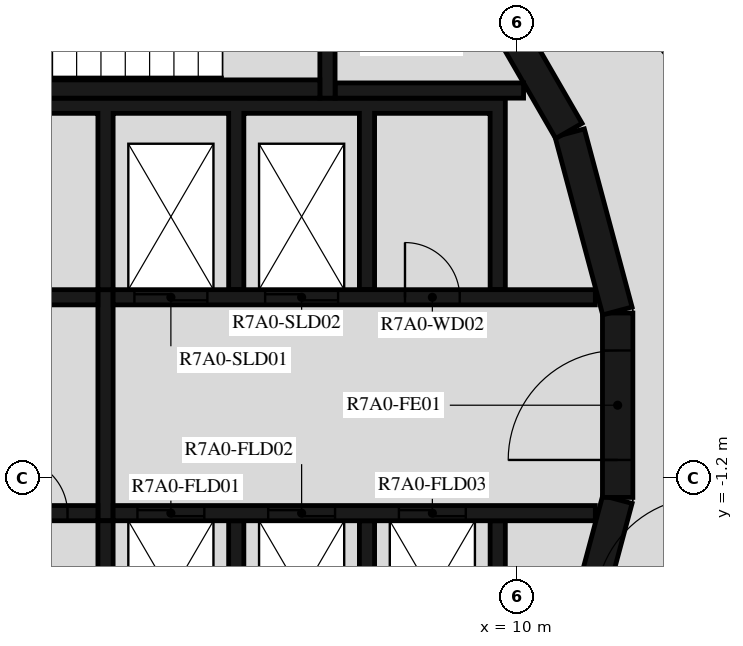
"""IFC4 building model, lengths in metres.
Left out: names, types, materials, properties, quantities, classifications, styles, units other than length and angle.
Written with IfcOpenShell. Run it as: python <this file> out.ifc"""

import sys

from ifc_helpers import new_model, si_unit, direction, frame, frame_2d, origin, place, context, subcontext, project, spatial, polyline, rectangle, outline, extrude, element, fill, save


model = new_model("IFC4")
c1 = context("Model", 3, precision=1e-05, world=origin(), true_north=direction((0.0, 1.0)))
c2 = subcontext(c1, "Body", "Model", "MODEL_VIEW")
j1 = project(units=[si_unit("LENGTHUNIT", "METRE"), si_unit("PLANEANGLEUNIT", "RADIAN")], contexts=[c1])
p1 = place(None, origin())
s1 = spatial("IfcSite", under=j1, at=p1, CompositionType="ELEMENT")
p2 = place(p1, origin())
s2 = spatial("IfcBuilding", under=s1, at=p2, CompositionType="ELEMENT")
p3 = place(p2, frame((0.0, 0.0, 263.4)))
s3 = spatial("IfcBuildingStorey", under=s2, at=p3, CompositionType="ELEMENT", Elevation=263.4)
p4 = place(p3, frame((10.858, -4.479, 0.0), z_axis=(0.0, 0.0, 1.0), x_axis=(0.258734743916, 0.965948410781, 0.0)))
e1 = element("IfcWall", 1, at=p4, inside=s3, PredefinedType="SHEAR", context=c2, shape_type="SweptSolid", body=[
    extrude(rectangle(XDim=3.033, YDim=0.5, at=frame_2d((1.516, 0.0))), origin(), (0.0, 0.0, 1.0), 3.12),
])
p5 = place(p3, frame((11.647, -1.516, 0.0), z_axis=(0.0, 0.0, 1.0), x_axis=(0.0, 1.0, 0.0)))
e2 = element("IfcWall", 2, at=p5, inside=s3, PredefinedType="SHEAR", context=c2, shape_type="SweptSolid", body=[
    extrude(rectangle(XDim=3.033, YDim=0.5, at=frame_2d((1.516, 0.0))), origin(), (0.0, 0.0, 1.0), 3.12),
])
p6 = place(p5, frame((0.616, 0.0, 0.0)))
e3 = element("IfcOpeningElement", 3, at=p6, cuts=e2, PredefinedType="OPENING", context=c2, shape_type="SweptSolid", body=[
    extrude(rectangle(XDim=1.8, YDim=2.1, at=frame_2d((0.9, 1.05))), frame((0.0, 0.26, 0.0), z_axis=(0.0, -1.0, 0.0), x_axis=(1.0, 0.0, 0.0)), (0.0, 0.0, 1.0), 0.52),
])
for number, where, z_axis, x_axis in (
    (4, (11.643, 1.55, 0.0), (0.0, 0.0, 1.0), (-0.259, 0.966, 0.0)),
    (5, (10.845, 4.51, 0.0), (0.0, 0.0, 1.0), (-0.5, 0.866, 0.0)),
):
    element("IfcWall", number, at=place(p3, frame(where, z_axis=z_axis, x_axis=x_axis)), inside=s3, PredefinedType="SHEAR", context=c2, shape_type="SweptSolid", body=[
        extrude(rectangle(XDim=3.033, YDim=0.5, at=frame_2d((1.516, 0.0))), origin(), (0.0, 0.0, 1.0), 3.12),
    ])
p7 = place(p3, frame((0.0, 5.2, 0.0), z_axis=(0.0, 0.0, 1.0), x_axis=(1.0, 0.0, 0.0)))
e6 = element("IfcWall", 6, at=p7, inside=s3, PredefinedType="SHEAR", context=c2, shape_type="SweptSolid", body=[
    extrude(rectangle(XDim=6.75, YDim=0.3, at=frame_2d((3.375, 0.0))), origin(), (0.0, 0.0, 1.0), 3.12),
])
p8 = place(p3, frame((6.875, 5.05, 0.0), z_axis=(0.0, 0.0, 1.0), x_axis=(0.0, 1.0, 0.0)))
e7 = element("IfcWall", 7, at=p8, inside=s3, PredefinedType="SHEAR", context=c2, shape_type="SweptSolid", body=[
    extrude(rectangle(XDim=3.92, YDim=0.25, at=frame_2d((1.96, 0.0))), origin(), (0.0, 0.0, 1.0), 3.12),
])
p9 = place(p8, frame((1.11, 0.0, 0.0)))
e8 = element("IfcOpeningElement", 8, at=p9, cuts=e7, PredefinedType="OPENING", context=c2, shape_type="SweptSolid", body=[
    extrude(rectangle(XDim=1.2, YDim=2.1, at=frame_2d((0.6, 1.05))), frame((0.0, 0.135, 0.0), z_axis=(0.0, -1.0, 0.0), x_axis=(1.0, 0.0, 0.0)), (0.0, 0.0, 1.0), 0.27),
])
p10 = place(p3, frame((7.0, 5.175, 0.0), z_axis=(0.0, 0.0, 1.0), x_axis=(1.0, 0.0, 0.0)))
e9 = element("IfcWall", 9, at=p10, inside=s3, PredefinedType="SHEAR", context=c2, shape_type="SweptSolid", body=[
    extrude(rectangle(XDim=3.1, YDim=0.25, at=frame_2d((1.55, 0.0))), origin(), (0.0, 0.0, 1.0), 3.12),
])
p11 = place(p3, origin())
e10 = element("IfcWall", 10, at=p11, inside=s3, PredefinedType="SHEAR", context=c2, shape_type="SweptSolid", body=[
    extrude(outline(polyline([(-9.8, 1.9), (-9.55, 1.9), (-9.55, 4.8), (3.1, 4.8), (3.1, 1.9), (3.35, 1.9), (3.35, 4.8), (5.25, 4.8), (5.25, 1.9), (5.5, 1.9), (5.5, 4.8), (7.4, 4.8), (7.4, 1.9), (7.65, 1.9), (7.65, 4.8), (9.55, 4.8), (9.55, 1.9), (9.8, 1.9), (9.8, 4.8), (9.8, 5.05), (-9.8, 5.05), (-9.8, 4.8), (-9.8, 1.9)])), origin(), (0.0, 0.0, 1.0), 3.12),
])
p12 = place(p3, origin())
e11 = element("IfcWall", 11, at=p12, inside=s3, PredefinedType="SHEAR", context=c2, shape_type="SweptSolid", body=[
    extrude(outline(polyline([(9.8, -5.05), (9.8, -4.8), (9.8, -1.9), (9.55, -1.9), (9.55, -4.8), (7.65, -4.8), (7.65, -1.9), (7.4, -1.9), (7.4, -4.8), (5.5, -4.8), (5.5, -1.9), (5.25, -1.9), (5.25, -4.8), (3.35, -4.8), (3.35, -1.9), (3.1, -1.9), (3.1, -4.8), (1.2, -4.8), (1.2, -1.9), (0.95, -1.9), (0.95, -4.8), (-0.95, -4.8), (-0.95, -1.9), (-1.2, -1.9), (-1.2, -4.8), (-3.1, -4.8), (-3.1, -1.9), (-3.35, -1.9), (-3.35, -4.8), (-5.25, -4.8), (-5.25, -1.9), (-5.5, -1.9), (-5.5, -4.8), (-7.4, -4.8), (-7.4, -1.9), (-7.65, -1.9), (-7.65, -4.8), (-9.55, -4.8), (-9.55, -1.9), (-9.8, -1.9), (-9.8, -4.8), (-9.8, -5.05), (9.8, -5.05)])), origin(), (0.0, 0.0, 1.0), 3.12),
])
p13 = place(p3, frame((-11.28, 1.775, 0.0), z_axis=(0.0, 0.0, 1.0), x_axis=(1.0, 0.0, 0.0)))
e12 = element("IfcWall", 12, at=p13, inside=s3, PredefinedType="SHEAR", context=c2, shape_type="SweptSolid", body=[
    extrude(rectangle(XDim=14.38, YDim=0.25, at=frame_2d((7.19, 0.0))), origin(), (0.0, 0.0, 1.0), 3.12),
])
p14 = place(p13, frame((7.605, 0.0, 0.0)))
e13 = element("IfcOpeningElement", 13, at=p14, cuts=e12, PredefinedType="OPENING", context=c2, shape_type="SweptSolid", body=[
    extrude(rectangle(XDim=0.9, YDim=2.1, at=frame_2d((0.45, 1.05))), frame((0.0, 0.135, 0.0), z_axis=(0.0, -1.0, 0.0), x_axis=(1.0, 0.0, 0.0)), (0.0, 0.0, 1.0), 0.27),
])
p15 = place(p3, frame((3.35, 1.775, 0.0), z_axis=(0.0, 0.0, 1.0), x_axis=(1.0, 0.0, 0.0)))
e14 = element("IfcWall", 14, at=p15, inside=s3, PredefinedType="SHEAR", context=c2, shape_type="SweptSolid", body=[
    extrude(rectangle(XDim=7.93, YDim=0.25, at=frame_2d((3.965, 0.0))), origin(), (0.0, 0.0, 1.0), 3.12),
])
p16 = place(p15, frame((0.35, 0.0, 0.0)))
e15 = element("IfcOpeningElement", 15, at=p16, cuts=e14, PredefinedType="OPENING", context=c2, shape_type="SweptSolid", body=[
    extrude(rectangle(XDim=1.2, YDim=2.4, at=frame_2d((0.6, 1.2))), frame((0.0, 0.135, 0.0), z_axis=(0.0, -1.0, 0.0), x_axis=(1.0, 0.0, 0.0)), (0.0, 0.0, 1.0), 0.27),
])
p17 = place(p15, frame((2.5, 0.0, 0.0)))
e16 = element("IfcOpeningElement", 16, at=p17, cuts=e14, PredefinedType="OPENING", context=c2, shape_type="SweptSolid", body=[
    extrude(rectangle(XDim=1.2, YDim=2.4, at=frame_2d((0.6, 1.2))), frame((0.0, 0.135, 0.0), z_axis=(0.0, -1.0, 0.0), x_axis=(1.0, 0.0, 0.0)), (0.0, 0.0, 1.0), 0.27),
])
p18 = place(p15, frame((4.8, 0.0, 0.0)))
e17 = element("IfcOpeningElement", 17, at=p18, cuts=e14, PredefinedType="OPENING", context=c2, shape_type="SweptSolid", body=[
    extrude(rectangle(XDim=0.9, YDim=2.1, at=frame_2d((0.45, 1.05))), frame((0.0, 0.135, 0.0), z_axis=(0.0, -1.0, 0.0), x_axis=(1.0, 0.0, 0.0)), (0.0, 0.0, 1.0), 0.27),
])
p19 = place(p3, frame((-11.28, -1.775, 0.0), z_axis=(0.0, 0.0, 1.0), x_axis=(1.0, 0.0, 0.0)))
e18 = element("IfcWall", 18, at=p19, inside=s3, PredefinedType="SHEAR", context=c2, shape_type="SweptSolid", body=[
    extrude(rectangle(XDim=14.38, YDim=0.25, at=frame_2d((7.19, 0.0))), origin(), (0.0, 0.0, 1.0), 3.12),
])
p20 = place(p19, frame((2.03, 0.0, 0.0)))
e19 = element("IfcOpeningElement", 19, at=p20, cuts=e18, PredefinedType="OPENING", context=c2, shape_type="SweptSolid", body=[
    extrude(rectangle(XDim=1.3, YDim=2.1, at=frame_2d((0.65, 1.05))), frame((0.0, 0.135, 0.0), z_axis=(0.0, -1.0, 0.0), x_axis=(1.0, 0.0, 0.0)), (0.0, 0.0, 1.0), 0.27),
])
p21 = place(p19, frame((4.18, 0.0, 0.0)))
e20 = element("IfcOpeningElement", 20, at=p21, cuts=e18, PredefinedType="OPENING", context=c2, shape_type="SweptSolid", body=[
    extrude(rectangle(XDim=1.3, YDim=2.1, at=frame_2d((0.65, 1.05))), frame((0.0, 0.135, 0.0), z_axis=(0.0, -1.0, 0.0), x_axis=(1.0, 0.0, 0.0)), (0.0, 0.0, 1.0), 0.27),
])
p22 = place(p19, frame((6.43, 0.0, 0.0)))
e21 = element("IfcOpeningElement", 21, at=p22, cuts=e18, PredefinedType="OPENING", context=c2, shape_type="SweptSolid", body=[
    extrude(rectangle(XDim=1.1, YDim=2.1, at=frame_2d((0.55, 1.05))), frame((0.0, 0.135, 0.0), z_axis=(0.0, -1.0, 0.0), x_axis=(1.0, 0.0, 0.0)), (0.0, 0.0, 1.0), 0.27),
])
p23 = place(p19, frame((8.58, 0.0, 0.0)))
e22 = element("IfcOpeningElement", 22, at=p23, cuts=e18, PredefinedType="OPENING", context=c2, shape_type="SweptSolid", body=[
    extrude(rectangle(XDim=1.1, YDim=2.1, at=frame_2d((0.55, 1.05))), frame((0.0, 0.135, 0.0), z_axis=(0.0, -1.0, 0.0), x_axis=(1.0, 0.0, 0.0)), (0.0, 0.0, 1.0), 0.27),
])
p24 = place(p19, frame((10.73, 0.0, 0.0)))
e23 = element("IfcOpeningElement", 23, at=p24, cuts=e18, PredefinedType="OPENING", context=c2, shape_type="SweptSolid", body=[
    extrude(rectangle(XDim=1.1, YDim=2.1, at=frame_2d((0.55, 1.05))), frame((0.0, 0.135, 0.0), z_axis=(0.0, -1.0, 0.0), x_axis=(1.0, 0.0, 0.0)), (0.0, 0.0, 1.0), 0.27),
])
p25 = place(p19, frame((12.98, 0.0, 0.0)))
e24 = element("IfcOpeningElement", 24, at=p25, cuts=e18, PredefinedType="OPENING", context=c2, shape_type="SweptSolid", body=[
    extrude(rectangle(XDim=0.9, YDim=2.1, at=frame_2d((0.45, 1.05))), frame((0.0, 0.135, 0.0), z_axis=(0.0, -1.0, 0.0), x_axis=(1.0, 0.0, 0.0)), (0.0, 0.0, 1.0), 0.27),
])
p26 = place(p3, frame((3.35, -1.775, 0.0), z_axis=(0.0, 0.0, 1.0), x_axis=(1.0, 0.0, 0.0)))
e25 = element("IfcWall", 25, at=p26, inside=s3, PredefinedType="SHEAR", context=c2, shape_type="SweptSolid", body=[
    extrude(rectangle(XDim=7.93, YDim=0.25, at=frame_2d((3.965, 0.0))), origin(), (0.0, 0.0, 1.0), 3.12),
])
p27 = place(p26, frame((0.4, 0.0, 0.0)))
e26 = element("IfcOpeningElement", 26, at=p27, cuts=e25, PredefinedType="OPENING", context=c2, shape_type="SweptSolid", body=[
    extrude(rectangle(XDim=1.1, YDim=2.4, at=frame_2d((0.55, 1.2))), frame((0.0, 0.135, 0.0), z_axis=(0.0, -1.0, 0.0), x_axis=(1.0, 0.0, 0.0)), (0.0, 0.0, 1.0), 0.27),
])
p28 = place(p26, frame((2.55, 0.0, 0.0)))
e27 = element("IfcOpeningElement", 27, at=p28, cuts=e25, PredefinedType="OPENING", context=c2, shape_type="SweptSolid", body=[
    extrude(rectangle(XDim=1.1, YDim=2.4, at=frame_2d((0.55, 1.2))), frame((0.0, 0.135, 0.0), z_axis=(0.0, -1.0, 0.0), x_axis=(1.0, 0.0, 0.0)), (0.0, 0.0, 1.0), 0.27),
])
p29 = place(p26, frame((4.7, 0.0, 0.0)))
e28 = element("IfcOpeningElement", 28, at=p29, cuts=e25, PredefinedType="OPENING", context=c2, shape_type="SweptSolid", body=[
    extrude(rectangle(XDim=1.1, YDim=2.4, at=frame_2d((0.55, 1.2))), frame((0.0, 0.135, 0.0), z_axis=(0.0, -1.0, 0.0), x_axis=(1.0, 0.0, 0.0)), (0.0, 0.0, 1.0), 0.27),
])
p30 = place(p3, frame((3.225, -1.9, 0.0), z_axis=(0.0, 0.0, 1.0), x_axis=(0.0, 1.0, 0.0)))
e29 = element("IfcWall", 29, at=p30, inside=s3, PredefinedType="SHEAR", context=c2, shape_type="SweptSolid", body=[
    extrude(rectangle(XDim=3.8, YDim=0.25, at=frame_2d((1.9, 0.0))), origin(), (0.0, 0.0, 1.0), 3.12),
])
p31 = place(p3, frame((11.223, -8.154, 0.0), z_axis=(0.0, 0.0, 1.0), x_axis=(0.358341090983, 0.93359073609, 0.0)))
e30 = element("IfcWall", 30, at=p31, inside=s3, PredefinedType="STANDARD", context=c2, shape_type="SweptSolid", body=[
    extrude(rectangle(XDim=7.181, YDim=0.2, at=frame_2d((3.59, 0.0))), origin(), (0.0, 0.0, 1.0), 3.12),
])
p32 = place(p31, frame((5.185, 0.0, 0.0)))
e31 = element("IfcOpeningElement", 31, at=p32, cuts=e30, PredefinedType="OPENING", context=c2, shape_type="SweptSolid", body=[
    extrude(rectangle(XDim=1.8, YDim=2.1, at=frame_2d((0.9, 1.05))), frame((0.0, 0.11, 0.0), z_axis=(0.0, -1.0, 0.0), x_axis=(1.0, 0.0, 0.0)), (0.0, 0.0, 1.0), 0.22),
])
p33 = place(p3, frame((12.673, 5.643, 0.0), z_axis=(0.0, 0.0, 1.0), x_axis=(-0.629302871585, 0.777160148113, 0.0)))
e32 = element("IfcWall", 32, at=p33, inside=s3, PredefinedType="STANDARD", context=c2, shape_type="SweptSolid", body=[
    extrude(rectangle(XDim=7.181, YDim=0.2, at=frame_2d((3.59, 0.0))), origin(), (0.0, 0.0, 1.0), 3.12),
])
p34 = place(p33, frame((4.1, 0.0, 0.0)))
e33 = element("IfcOpeningElement", 33, at=p34, cuts=e32, PredefinedType="OPENING", context=c2, shape_type="SweptSolid", body=[
    extrude(rectangle(XDim=1.0, YDim=2.1, at=frame_2d((0.5, 1.05))), frame((0.0, 0.11, 0.0), z_axis=(0.0, -1.0, 0.0), x_axis=(1.0, 0.0, 0.0)), (0.0, 0.0, 1.0), 0.22),
])
p35 = place(p6, origin())
e34 = element("IfcDoor", 34, at=p35, inside=s3, OperationType="DOUBLE_DOOR_SINGLE_SWING", PredefinedType="DOOR", context=c2, shape_type="SweptSolid", body=[
    extrude(rectangle(XDim=1.8, YDim=2.1, at=frame_2d((0.9, 1.05))), frame((0.0, 0.025, 0.0), z_axis=(0.0, -1.0, 0.0), x_axis=(1.0, 0.0, 0.0)), (0.0, 0.0, 1.0), 0.05),
])
fill(e3, e34)
p36 = place(p16, origin())
e35 = element("IfcDoor", 35, at=p36, inside=s3, OperationType="DOUBLE_DOOR_SLIDING", PredefinedType="DOOR", context=c2, shape_type="SweptSolid", body=[
    extrude(rectangle(XDim=1.2, YDim=2.4, at=frame_2d((0.6, 1.2))), frame((0.0, 0.025, 0.0), z_axis=(0.0, -1.0, 0.0), x_axis=(1.0, 0.0, 0.0)), (0.0, 0.0, 1.0), 0.05),
])
fill(e15, e35)
p37 = place(p17, origin())
e36 = element("IfcDoor", 36, at=p37, inside=s3, OperationType="DOUBLE_DOOR_SLIDING", PredefinedType="DOOR", context=c2, shape_type="SweptSolid", body=[
    extrude(rectangle(XDim=1.2, YDim=2.4, at=frame_2d((0.6, 1.2))), frame((0.0, 0.025, 0.0), z_axis=(0.0, -1.0, 0.0), x_axis=(1.0, 0.0, 0.0)), (0.0, 0.0, 1.0), 0.05),
])
fill(e16, e36)
p38 = place(p27, origin())
e37 = element("IfcDoor", 37, at=p38, inside=s3, OperationType="DOUBLE_DOOR_SLIDING", PredefinedType="DOOR", context=c2, shape_type="SweptSolid", body=[
    extrude(rectangle(XDim=1.1, YDim=2.4, at=frame_2d((0.55, 1.2))), frame((0.0, 0.025, 0.0), z_axis=(0.0, -1.0, 0.0), x_axis=(1.0, 0.0, 0.0)), (0.0, 0.0, 1.0), 0.05),
])
fill(e26, e37)
p39 = place(p28, origin())
e38 = element("IfcDoor", 38, at=p39, inside=s3, OperationType="DOUBLE_DOOR_SLIDING", PredefinedType="DOOR", context=c2, shape_type="SweptSolid", body=[
    extrude(rectangle(XDim=1.1, YDim=2.4, at=frame_2d((0.55, 1.2))), frame((0.0, 0.025, 0.0), z_axis=(0.0, -1.0, 0.0), x_axis=(1.0, 0.0, 0.0)), (0.0, 0.0, 1.0), 0.05),
])
fill(e27, e38)
p40 = place(p29, origin())
e39 = element("IfcDoor", 39, at=p40, inside=s3, OperationType="DOUBLE_DOOR_SLIDING", PredefinedType="DOOR", context=c2, shape_type="SweptSolid", body=[
    extrude(rectangle(XDim=1.1, YDim=2.4, at=frame_2d((0.55, 1.2))), frame((0.0, 0.025, 0.0), z_axis=(0.0, -1.0, 0.0), x_axis=(1.0, 0.0, 0.0)), (0.0, 0.0, 1.0), 0.05),
])
fill(e28, e39)
p41 = place(p18, origin())
e40 = element("IfcDoor", 40, at=p41, inside=s3, OperationType="SINGLE_SWING_RIGHT", PredefinedType="DOOR", context=c2, shape_type="SweptSolid", body=[
    extrude(rectangle(XDim=0.9, YDim=2.1, at=frame_2d((0.45, 1.05))), frame((0.0, 0.025, 0.0), z_axis=(0.0, -1.0, 0.0), x_axis=(1.0, 0.0, 0.0)), (0.0, 0.0, 1.0), 0.05),
])
fill(e17, e40)
p42 = place(p25, origin())
e41 = element("IfcDoor", 41, at=p42, inside=s3, OperationType="SINGLE_SWING_LEFT", PredefinedType="DOOR", context=c2, shape_type="SweptSolid", body=[
    extrude(rectangle(XDim=0.9, YDim=2.1, at=frame_2d((0.45, 1.05))), frame((0.0, 0.025, 0.0), z_axis=(0.0, -1.0, 0.0), x_axis=(1.0, 0.0, 0.0)), (0.0, 0.0, 1.0), 0.05),
])
fill(e24, e41)
save(model, sys.argv[1])
